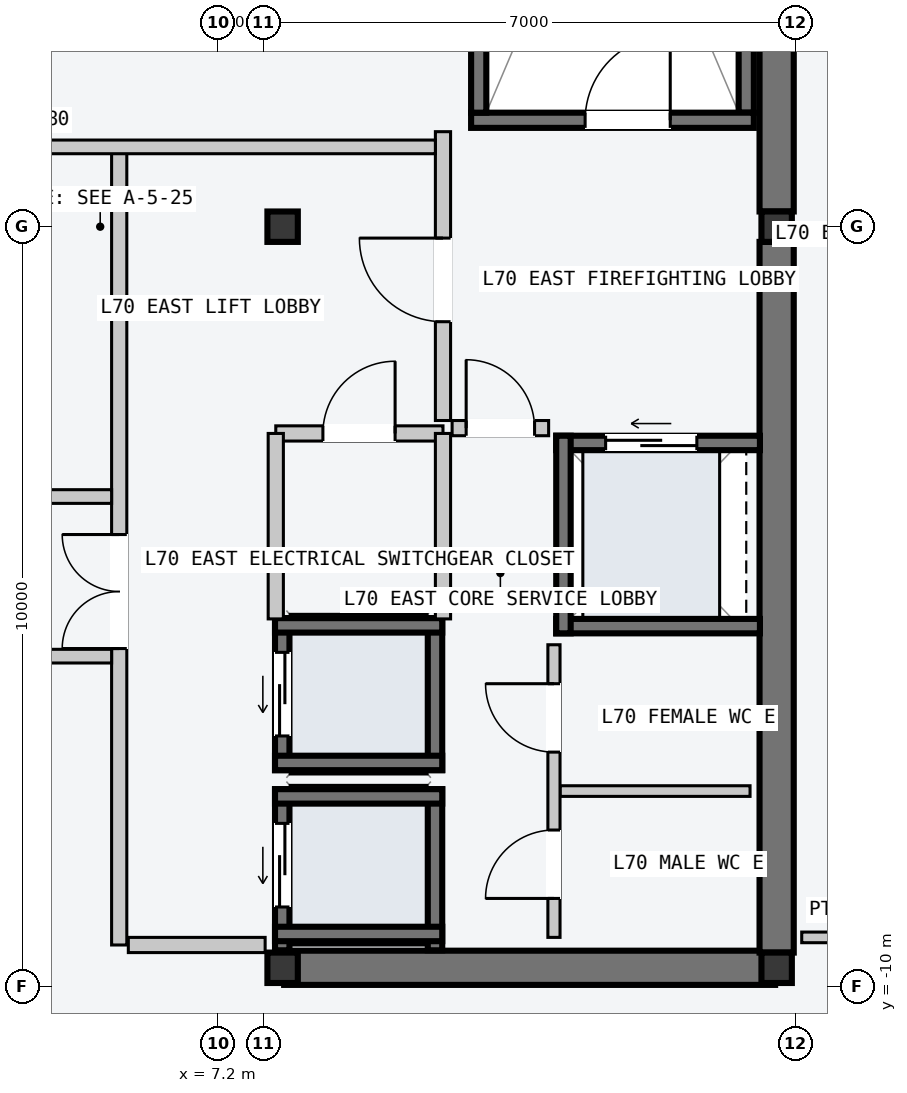
"""IFC4 building model, lengths in metres.
Left out: names, types, materials, properties, quantities, classifications, styles, units other than length and angle.
Written with IfcOpenShell. Run it as: python <this file> out.ifc"""

import sys

from ifc_helpers import new_model, si_unit, direction, frame, frame_2d, origin, origin_2d, place, context, subcontext, project, spatial, rectangle, i_section, extrude, element, fill, save


model = new_model("IFC4")
c1 = context("Model", 3, precision=1e-05, world=origin(), true_north=direction((0.0, 1.0)))
c2 = subcontext(c1, "Body", "Model", "MODEL_VIEW")
j1 = project(units=[si_unit("LENGTHUNIT", "METRE"), si_unit("PLANEANGLEUNIT", "RADIAN")], contexts=[c1])
p1 = place(None, origin())
s1 = spatial("IfcSite", under=j1, at=p1, CompositionType="ELEMENT")
p2 = place(p1, origin())
s2 = spatial("IfcBuilding", under=s1, at=p2, CompositionType="ELEMENT")
p3 = place(p2, frame((0.0, 0.0, 265.2)))
s3 = spatial("IfcBuildingStorey", under=s2, at=p3, CompositionType="ELEMENT", Elevation=265.2)
p4 = place(p3, frame((8.07, -9.75, -0.2), z_axis=(0.0, 0.0, 1.0), x_axis=(1.0, 0.0, 0.0)))
e1 = element("IfcWall", 1, at=p4, inside=s3, PredefinedType="SHEAR", context=c2, shape_type="SweptSolid", body=[
    extrude(rectangle(XDim=6.46, YDim=0.45, at=frame_2d((3.23, 0.0))), origin(), (0.0, 0.0, 1.0), 3.6),
])
for number, where, z_axis, x_axis in (
    (2, (14.55, -9.55, -0.2), (0.0, 0.0, 1.0), (0.0, 1.0, 0.0)),
    (3, (14.55, 0.2, -0.2), (0.0, 0.0, 1.0), (0.0, 1.0, 0.0)),
):
    element("IfcWall", number, at=place(p3, frame(where, z_axis=z_axis, x_axis=x_axis)), inside=s3, PredefinedType="SHEAR", context=c2, shape_type="SweptSolid", body=[
        extrude(rectangle(XDim=9.35, YDim=0.45, at=frame_2d((4.675, 0.0))), origin(), (0.0, 0.0, 1.0), 3.6),
    ])
p5 = place(p3, frame((14.15, 1.5, -0.2), z_axis=(0.0, 0.0, 1.0), x_axis=(0.0, 1.0, 0.0)))
e4 = element("IfcWall", 4, at=p5, inside=s3, PredefinedType="SOLIDWALL", context=c2, shape_type="SweptSolid", body=[
    extrude(rectangle(XDim=7.8, YDim=0.2, at=frame_2d((3.9, 0.0))), origin(), (0.0, 0.0, 1.0), 3.6),
])
p6 = place(p3, frame((10.53, 1.4, -0.2), z_axis=(0.0, 0.0, 1.0), x_axis=(1.0, 0.0, 0.0)))
e5 = element("IfcWall", 5, at=p6, inside=s3, PredefinedType="SOLIDWALL", context=c2, shape_type="SweptSolid", body=[
    extrude(rectangle(XDim=3.72, YDim=0.2, at=frame_2d((1.86, 0.0))), origin(), (0.0, 0.0, 1.0), 3.6),
])
p7 = place(p6, frame((1.5, 0.0, 0.2)))
e6 = element("IfcOpeningElement", 6, at=p7, cuts=e5, PredefinedType="OPENING", context=c2, shape_type="SweptSolid", body=[
    extrude(rectangle(XDim=1.12, YDim=2.18, at=frame_2d((0.56, 1.09))), frame((0.0, 0.11, 0.0), z_axis=(0.0, -1.0, 0.0), x_axis=(1.0, 0.0, 0.0)), (0.0, 0.0, 1.0), 0.22),
])
p8 = place(p3, frame((10.63, 1.5, -0.2), z_axis=(0.0, 0.0, 1.0), x_axis=(0.0, 1.0, 0.0)))
e7 = element("IfcWall", 7, at=p8, inside=s3, PredefinedType="SOLIDWALL", context=c2, shape_type="SweptSolid", body=[
    extrude(rectangle(XDim=7.8, YDim=0.2, at=frame_2d((3.9, 0.0))), origin(), (0.0, 0.0, 1.0), 3.6),
])
for number, where, z_axis, x_axis in (
    (8, (8.05, -9.75, 0.0), (0.0, 0.0, 1.0), (1.0, 0.0, 0.0)),
    (9, (8.05, 0.0, 0.0), (0.0, 0.0, 1.0), (1.0, 0.0, 0.0)),
    (10, (14.55, -9.75, 0.0), (0.0, 0.0, 1.0), (1.0, 0.0, 0.0)),
    (11, (14.55, 0.0, 0.0), (0.0, 0.0, 1.0), (1.0, 0.0, 0.0)),
):
    element("IfcColumn", number, at=place(p3, frame(where, z_axis=z_axis, x_axis=x_axis)), inside=s3, PredefinedType="COLUMN", context=c2, shape_type="SweptSolid", body=[
        extrude(i_section(OverallWidth=0.4, OverallDepth=0.4, WebThickness=0.013, FlangeThickness=0.021, at=origin_2d()), origin(), (0.0, 0.0, 1.0), 3.6),
    ])
p9 = place(p3, frame((8.045, -9.52, -0.2), z_axis=(0.0, 0.0, 1.0), x_axis=(0.0, 1.0, 0.0)))
e12 = element("IfcWall", 12, at=p9, inside=s3, PredefinedType="SOLIDWALL", context=c2, shape_type="SweptSolid", body=[
    extrude(rectangle(XDim=2.12, YDim=0.19, at=frame_2d((1.06, 0.0))), origin(), (0.0, 0.0, 1.0), 3.6),
])
p10 = place(p9, frame((0.57, 0.0, 0.2)))
e13 = element("IfcOpeningElement", 13, at=p10, cuts=e12, PredefinedType="OPENING", context=c2, shape_type="SweptSolid", body=[
    extrude(rectangle(XDim=1.1, YDim=2.2, at=frame_2d((0.55, 1.1))), frame((0.0, 0.105, 0.0), z_axis=(0.0, -1.0, 0.0), x_axis=(1.0, 0.0, 0.0)), (0.0, 0.0, 1.0), 0.21),
])
p11 = place(p3, frame((10.055, -9.52, -0.2), z_axis=(0.0, 0.0, 1.0), x_axis=(0.0, 1.0, 0.0)))
e14 = element("IfcWall", 14, at=p11, inside=s3, PredefinedType="SOLIDWALL", context=c2, shape_type="SweptSolid", body=[
    extrude(rectangle(XDim=2.12, YDim=0.19, at=frame_2d((1.06, 0.0))), origin(), (0.0, 0.0, 1.0), 3.6),
])
for number, where, z_axis, x_axis in (
    (15, (7.95, -7.495, -0.2), (0.0, 0.0, 1.0), (1.0, 0.0, 0.0)),
    (16, (7.95, -9.305, -0.2), (0.0, 0.0, 1.0), (1.0, 0.0, 0.0)),
):
    element("IfcWall", number, at=place(p3, frame(where, z_axis=z_axis, x_axis=x_axis)), inside=s3, PredefinedType="SOLIDWALL", context=c2, shape_type="SweptSolid", body=[
        extrude(rectangle(XDim=2.2, YDim=0.19, at=frame_2d((1.1, 0.0))), origin(), (0.0, 0.0, 1.0), 3.6),
    ])
p12 = place(p3, frame((8.045, -7.15, -0.2), z_axis=(0.0, 0.0, 1.0), x_axis=(0.0, 1.0, 0.0)))
e17 = element("IfcWall", 17, at=p12, inside=s3, PredefinedType="SOLIDWALL", context=c2, shape_type="SweptSolid", body=[
    extrude(rectangle(XDim=2.0, YDim=0.19, at=frame_2d((1.0, 0.0))), origin(), (0.0, 0.0, 1.0), 3.6),
])
p13 = place(p12, frame((0.45, 0.0, 0.2)))
e18 = element("IfcOpeningElement", 18, at=p13, cuts=e17, PredefinedType="OPENING", context=c2, shape_type="SweptSolid", body=[
    extrude(rectangle(XDim=1.1, YDim=2.2, at=frame_2d((0.55, 1.1))), frame((0.0, 0.105, 0.0), z_axis=(0.0, -1.0, 0.0), x_axis=(1.0, 0.0, 0.0)), (0.0, 0.0, 1.0), 0.21),
])
p14 = place(p3, frame((10.055, -7.15, -0.2), z_axis=(0.0, 0.0, 1.0), x_axis=(0.0, 1.0, 0.0)))
e19 = element("IfcWall", 19, at=p14, inside=s3, PredefinedType="SOLIDWALL", context=c2, shape_type="SweptSolid", body=[
    extrude(rectangle(XDim=2.0, YDim=0.19, at=frame_2d((1.0, 0.0))), origin(), (0.0, 0.0, 1.0), 3.6),
])
for number, where, z_axis, x_axis in (
    (20, (7.95, -5.245, -0.2), (0.0, 0.0, 1.0), (1.0, 0.0, 0.0)),
    (21, (7.95, -7.055, -0.2), (0.0, 0.0, 1.0), (1.0, 0.0, 0.0)),
):
    element("IfcWall", number, at=place(p3, frame(where, z_axis=z_axis, x_axis=x_axis)), inside=s3, PredefinedType="SOLIDWALL", context=c2, shape_type="SweptSolid", body=[
        extrude(rectangle(XDim=2.2, YDim=0.19, at=frame_2d((1.1, 0.0))), origin(), (0.0, 0.0, 1.0), 3.6),
    ])
p15 = place(p3, frame((11.65, -2.845, -0.2), z_axis=(0.0, 0.0, 1.0), x_axis=(1.0, 0.0, 0.0)))
e22 = element("IfcWall", 22, at=p15, inside=s3, PredefinedType="SOLIDWALL", context=c2, shape_type="SweptSolid", body=[
    extrude(rectangle(XDim=2.68, YDim=0.19, at=frame_2d((1.34, 0.0))), origin(), (0.0, 0.0, 1.0), 3.6),
])
p16 = place(p15, frame((0.65, 0.0, 0.2)))
e23 = element("IfcOpeningElement", 23, at=p16, cuts=e22, PredefinedType="OPENING", context=c2, shape_type="SweptSolid", body=[
    extrude(rectangle(XDim=1.2, YDim=2.2, at=frame_2d((0.6, 1.1))), frame((0.0, 0.105, 0.0), z_axis=(0.0, -1.0, 0.0), x_axis=(1.0, 0.0, 0.0)), (0.0, 0.0, 1.0), 0.21),
])
p17 = place(p3, frame((11.65, -5.255, -0.2), z_axis=(0.0, 0.0, 1.0), x_axis=(1.0, 0.0, 0.0)))
e24 = element("IfcWall", 24, at=p17, inside=s3, PredefinedType="SOLIDWALL", context=c2, shape_type="SweptSolid", body=[
    extrude(rectangle(XDim=2.68, YDim=0.19, at=frame_2d((1.34, 0.0))), origin(), (0.0, 0.0, 1.0), 3.6),
])
p18 = place(p3, frame((11.745, -5.35, -0.2), z_axis=(0.0, 0.0, 1.0), x_axis=(0.0, 1.0, 0.0)))
e25 = element("IfcWall", 25, at=p18, inside=s3, PredefinedType="SOLIDWALL", context=c2, shape_type="SweptSolid", body=[
    extrude(rectangle(XDim=2.6, YDim=0.19, at=frame_2d((1.3, 0.0))), origin(), (0.0, 0.0, 1.0), 3.6),
])
p19 = place(p3, frame((5.9, -9.45, 0.0), z_axis=(0.0, 0.0, 1.0), x_axis=(0.0, 1.0, 0.0)))
e26 = element("IfcWall", 26, at=p19, inside=s3, PredefinedType="PARTITIONING", context=c2, shape_type="SweptSolid", body=[
    extrude(rectangle(XDim=10.5, YDim=0.2, at=frame_2d((5.25, 0.0))), origin(), (0.0, 0.0, 1.0), 3.4),
])
p20 = place(p19, frame((3.9, 0.0, 0.0)))
e27 = element("IfcOpeningElement", 27, at=p20, cuts=e26, PredefinedType="OPENING", context=c2, shape_type="SweptSolid", body=[
    extrude(rectangle(XDim=1.5, YDim=2.2, at=frame_2d((0.75, 1.1))), frame((0.0, 0.11, 0.0), z_axis=(0.0, -1.0, 0.0), x_axis=(1.0, 0.0, 0.0)), (0.0, 0.0, 1.0), 0.22),
])
p21 = place(p3, frame((6.02, -9.45, 0.0), z_axis=(0.0, 0.0, 1.0), x_axis=(1.0, 0.0, 0.0)))
e28 = element("IfcWall", 28, at=p21, inside=s3, PredefinedType="PARTITIONING", context=c2, shape_type="SweptSolid", body=[
    extrude(rectangle(XDim=1.8, YDim=0.2, at=frame_2d((0.9, 0.0))), origin(), (0.0, 0.0, 1.0), 3.4),
])
p22 = place(p3, frame((10.16, -2.55, 0.0), z_axis=(0.0, 0.0, 1.0), x_axis=(0.0, 1.0, 0.0)))
e29 = element("IfcWall", 29, at=p22, inside=s3, PredefinedType="PARTITIONING", context=c2, shape_type="SweptSolid", body=[
    extrude(rectangle(XDim=3.8, YDim=0.2, at=frame_2d((1.9, 0.0))), origin(), (0.0, 0.0, 1.0), 3.4),
])
p23 = place(p22, frame((1.3, 0.0, 0.0)))
e30 = element("IfcOpeningElement", 30, at=p23, cuts=e29, PredefinedType="OPENING", context=c2, shape_type="SweptSolid", body=[
    extrude(rectangle(XDim=1.1, YDim=2.15, at=frame_2d((0.55, 1.075))), frame((0.0, 0.11, 0.0), z_axis=(0.0, -1.0, 0.0), x_axis=(1.0, 0.0, 0.0)), (0.0, 0.0, 1.0), 0.22),
])
p24 = place(p3, frame((10.28, -2.65, 0.0), z_axis=(0.0, 0.0, 1.0), x_axis=(1.0, 0.0, 0.0)))
e31 = element("IfcWall", 31, at=p24, inside=s3, PredefinedType="PARTITIONING", context=c2, shape_type="SweptSolid", body=[
    extrude(rectangle(XDim=1.27, YDim=0.2, at=frame_2d((0.635, 0.0))), origin(), (0.0, 0.0, 1.0), 3.4),
])
p25 = place(p24, frame((0.185, 0.0, 0.0)))
e32 = element("IfcOpeningElement", 32, at=p25, cuts=e31, PredefinedType="OPENING", context=c2, shape_type="SweptSolid", body=[
    extrude(rectangle(XDim=0.9, YDim=2.15, at=frame_2d((0.45, 1.075))), frame((0.0, 0.11, 0.0), z_axis=(0.0, -1.0, 0.0), x_axis=(1.0, 0.0, 0.0)), (0.0, 0.0, 1.0), 0.22),
])
p26 = place(p3, frame((7.96, -2.72, 0.0), z_axis=(0.0, 0.0, 1.0), x_axis=(1.0, 0.0, 0.0)))
e33 = element("IfcWall", 33, at=p26, inside=s3, PredefinedType="PARTITIONING", context=c2, shape_type="SweptSolid", body=[
    extrude(rectangle(XDim=2.2, YDim=0.2, at=frame_2d((1.1, 0.0))), origin(), (0.0, 0.0, 1.0), 3.4),
])
p27 = place(p26, frame((0.62, 0.0, 0.0)))
e34 = element("IfcOpeningElement", 34, at=p27, cuts=e33, PredefinedType="OPENING", context=c2, shape_type="SweptSolid", body=[
    extrude(rectangle(XDim=0.95, YDim=2.1, at=frame_2d((0.475, 1.05))), frame((0.0, 0.11, 0.0), z_axis=(0.0, -1.0, 0.0), x_axis=(1.0, 0.0, 0.0)), (0.0, 0.0, 1.0), 0.22),
])
for number, where, z_axis, x_axis in (
    (35, (7.96, -5.16, 0.0), (0.0, 0.0, 1.0), (0.0, 1.0, 0.0)),
    (36, (10.16, -5.16, 0.0), (0.0, 0.0, 1.0), (0.0, 1.0, 0.0)),
):
    element("IfcWall", number, at=place(p3, frame(where, z_axis=z_axis, x_axis=x_axis)), inside=s3, PredefinedType="PARTITIONING", context=c2, shape_type="SweptSolid", body=[
        extrude(rectangle(XDim=2.44, YDim=0.2, at=frame_2d((1.22, 0.0))), origin(), (0.0, 0.0, 1.0), 3.4),
    ])
p28 = place(p3, frame((11.7, -7.425, 0.0), z_axis=(0.0, 0.0, 1.0), x_axis=(1.0, 0.0, 0.0)))
e37 = element("IfcWall", 37, at=p28, inside=s3, PredefinedType="PARTITIONING", context=c2, shape_type="SweptSolid", body=[
    extrude(rectangle(XDim=2.5, YDim=0.14, at=frame_2d((1.25, 0.0))), origin(), (0.0, 0.0, 1.0), 3.4),
])
p29 = place(p3, frame((11.62, -9.35, 0.0), z_axis=(0.0, 0.0, 1.0), x_axis=(0.0, 1.0, 0.0)))
e38 = element("IfcWall", 38, at=p29, inside=s3, PredefinedType="PARTITIONING", context=c2, shape_type="SweptSolid", body=[
    extrude(rectangle(XDim=3.85, YDim=0.16, at=frame_2d((1.925, 0.0))), origin(), (0.0, 0.0, 1.0), 3.4),
])
p30 = place(p29, frame((0.512, 0.0, 0.0)))
e39 = element("IfcOpeningElement", 39, at=p30, cuts=e38, PredefinedType="OPENING", context=c2, shape_type="SweptSolid", body=[
    extrude(rectangle(XDim=0.9, YDim=2.15, at=frame_2d((0.45, 1.075))), frame((0.0, 0.09, 0.0), z_axis=(0.0, -1.0, 0.0), x_axis=(1.0, 0.0, 0.0)), (0.0, 0.0, 1.0), 0.18),
])
p31 = place(p29, frame((2.438, 0.0, 0.0)))
e40 = element("IfcOpeningElement", 40, at=p31, cuts=e38, PredefinedType="OPENING", context=c2, shape_type="SweptSolid", body=[
    extrude(rectangle(XDim=0.9, YDim=2.15, at=frame_2d((0.45, 1.075))), frame((0.0, 0.09, 0.0), z_axis=(0.0, -1.0, 0.0), x_axis=(1.0, 0.0, 0.0)), (0.0, 0.0, 1.0), 0.18),
])
p32 = place(p3, frame((-0.49, 1.05, 0.0), z_axis=(0.0, 0.0, 1.0), x_axis=(1.0, 0.0, 0.0)))
e41 = element("IfcWall", 41, at=p32, inside=s3, PredefinedType="PARTITIONING", context=c2, shape_type="SweptSolid", body=[
    extrude(rectangle(XDim=10.55, YDim=0.18, at=frame_2d((5.275, 0.0))), origin(), (0.0, 0.0, 1.0), 3.4),
])
for number, where, z_axis, x_axis in (
    (42, (-0.49, -3.55, 0.0), (0.0, 0.0, 1.0), (1.0, 0.0, 0.0)),
    (43, (-0.49, -5.65, 0.0), (0.0, 0.0, 1.0), (1.0, 0.0, 0.0)),
):
    element("IfcWall", number, at=place(p3, frame(where, z_axis=z_axis, x_axis=x_axis)), inside=s3, PredefinedType="PARTITIONING", context=c2, shape_type="SweptSolid", body=[
        extrude(rectangle(XDim=6.29, YDim=0.18, at=frame_2d((3.145, 0.0))), origin(), (0.0, 0.0, 1.0), 3.4),
    ])
p33 = place(p3, frame((14.88, -9.35, 0.0), z_axis=(0.0, 0.0, 1.0), x_axis=(1.0, 0.0, 0.0)))
e44 = element("IfcWall", 44, at=p33, inside=s3, PredefinedType="PARTITIONING", context=c2, shape_type="SweptSolid", body=[
    extrude(rectangle(XDim=3.68, YDim=0.14, at=frame_2d((1.84, 0.0))), origin(), (0.0, 0.0, 1.0), 3.4),
])
p34 = place(p33, frame((1.36, 0.0, 0.0)))
e45 = element("IfcOpeningElement", 45, at=p34, cuts=e44, PredefinedType="OPENING", context=c2, shape_type="SweptSolid", body=[
    extrude(rectangle(XDim=0.96, YDim=2.18, at=frame_2d((0.48, 1.09))), frame((0.0, 0.08, 0.0), z_axis=(0.0, -1.0, 0.0), x_axis=(1.0, 0.0, 0.0)), (0.0, 0.0, 1.0), 0.16),
])
p35 = place(p7, origin())
e46 = element("IfcDoor", 46, at=p35, inside=s3, OperationType="SINGLE_SWING_RIGHT", PredefinedType="DOOR", context=c2, shape_type="SweptSolid", body=[
    extrude(rectangle(XDim=1.12, YDim=2.18, at=frame_2d((0.56, 1.09))), frame((0.0, 0.025, 0.0), z_axis=(0.0, -1.0, 0.0), x_axis=(1.0, 0.0, 0.0)), (0.0, 0.0, 1.0), 0.05),
])
fill(e6, e46)
p36 = place(p10, origin())
e47 = element("IfcDoor", 47, at=p36, inside=s3, OperationType="SLIDING_TO_LEFT", PredefinedType="DOOR", context=c2, shape_type="SweptSolid", body=[
    extrude(rectangle(XDim=1.1, YDim=2.2, at=frame_2d((0.55, 1.1))), frame((0.0, 0.025, 0.0), z_axis=(0.0, -1.0, 0.0), x_axis=(1.0, 0.0, 0.0)), (0.0, 0.0, 1.0), 0.05),
])
fill(e13, e47)
p37 = place(p13, origin())
e48 = element("IfcDoor", 48, at=p37, inside=s3, OperationType="SLIDING_TO_LEFT", PredefinedType="DOOR", context=c2, shape_type="SweptSolid", body=[
    extrude(rectangle(XDim=1.1, YDim=2.2, at=frame_2d((0.55, 1.1))), frame((0.0, 0.025, 0.0), z_axis=(0.0, -1.0, 0.0), x_axis=(1.0, 0.0, 0.0)), (0.0, 0.0, 1.0), 0.05),
])
fill(e18, e48)
p38 = place(p16, origin())
e49 = element("IfcDoor", 49, at=p38, inside=s3, OperationType="SLIDING_TO_LEFT", PredefinedType="DOOR", context=c2, shape_type="SweptSolid", body=[
    extrude(rectangle(XDim=1.2, YDim=2.2, at=frame_2d((0.6, 1.1))), frame((0.0, 0.025, 0.0), z_axis=(0.0, -1.0, 0.0), x_axis=(1.0, 0.0, 0.0)), (0.0, 0.0, 1.0), 0.05),
])
fill(e23, e49)
p39 = place(p20, origin())
e50 = element("IfcDoor", 50, at=p39, inside=s3, OperationType="DOUBLE_DOOR_SINGLE_SWING", PredefinedType="DOOR", context=c2, shape_type="SweptSolid", body=[
    extrude(rectangle(XDim=1.5, YDim=2.2, at=frame_2d((0.75, 1.1))), frame((0.0, 0.025, 0.0), z_axis=(0.0, -1.0, 0.0), x_axis=(1.0, 0.0, 0.0)), (0.0, 0.0, 1.0), 0.05),
])
fill(e27, e50)
p40 = place(p23, origin())
e51 = element("IfcDoor", 51, at=p40, inside=s3, OperationType="SINGLE_SWING_RIGHT", PredefinedType="DOOR", context=c2, shape_type="SweptSolid", body=[
    extrude(rectangle(XDim=1.1, YDim=2.15, at=frame_2d((0.55, 1.075))), frame((0.0, 0.025, 0.0), z_axis=(0.0, -1.0, 0.0), x_axis=(1.0, 0.0, 0.0)), (0.0, 0.0, 1.0), 0.05),
])
fill(e30, e51)
p41 = place(p25, origin())
e52 = element("IfcDoor", 52, at=p41, inside=s3, OperationType="SINGLE_SWING_LEFT", PredefinedType="DOOR", context=c2, shape_type="SweptSolid", body=[
    extrude(rectangle(XDim=0.9, YDim=2.15, at=frame_2d((0.45, 1.075))), frame((0.0, 0.025, 0.0), z_axis=(0.0, -1.0, 0.0), x_axis=(1.0, 0.0, 0.0)), (0.0, 0.0, 1.0), 0.05),
])
fill(e32, e52)
p42 = place(p27, origin())
e53 = element("IfcDoor", 53, at=p42, inside=s3, OperationType="SINGLE_SWING_RIGHT", PredefinedType="DOOR", context=c2, shape_type="SweptSolid", body=[
    extrude(rectangle(XDim=0.95, YDim=2.1, at=frame_2d((0.475, 1.05))), frame((0.0, 0.025, 0.0), z_axis=(0.0, -1.0, 0.0), x_axis=(1.0, 0.0, 0.0)), (0.0, 0.0, 1.0), 0.05),
])
fill(e34, e53)
p43 = place(p30, origin())
e54 = element("IfcDoor", 54, at=p43, inside=s3, OperationType="SINGLE_SWING_LEFT", PredefinedType="DOOR", context=c2, shape_type="SweptSolid", body=[
    extrude(rectangle(XDim=0.9, YDim=2.15, at=frame_2d((0.45, 1.075))), frame((0.0, 0.025, 0.0), z_axis=(0.0, -1.0, 0.0), x_axis=(1.0, 0.0, 0.0)), (0.0, 0.0, 1.0), 0.05),
])
fill(e39, e54)
p44 = place(p31, origin())
e55 = element("IfcDoor", 55, at=p44, inside=s3, OperationType="SINGLE_SWING_RIGHT", PredefinedType="DOOR", context=c2, shape_type="SweptSolid", body=[
    extrude(rectangle(XDim=0.9, YDim=2.15, at=frame_2d((0.45, 1.075))), frame((0.0, 0.025, 0.0), z_axis=(0.0, -1.0, 0.0), x_axis=(1.0, 0.0, 0.0)), (0.0, 0.0, 1.0), 0.05),
])
fill(e40, e55)
save(model, sys.argv[1])
